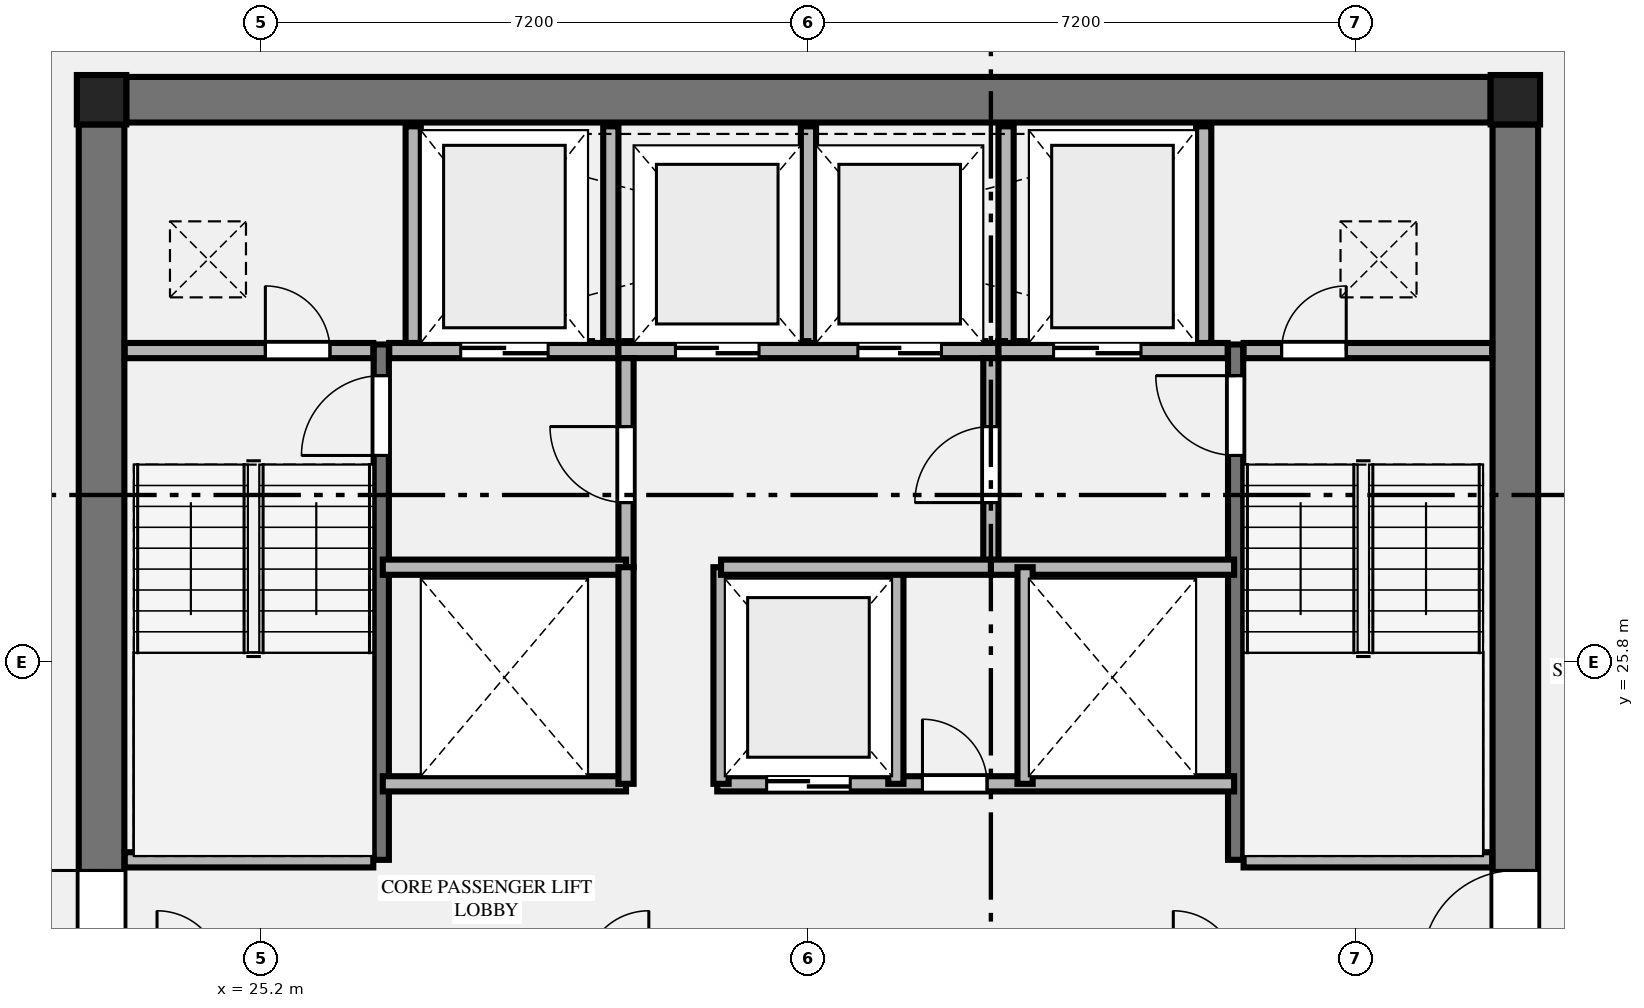
"""IFC4 building model, lengths in metres.
Left out: names, types, materials, properties, quantities, classifications, styles, units other than length and angle.
Written with IfcOpenShell. Run it as: python <this file> out.ifc"""

import sys

from ifc_helpers import new_model, si_unit, direction, frame, frame_2d, origin, origin_2d, place, context, subcontext, project, spatial, rectangle, extrude, element, fill, save


model = new_model("IFC4")
c1 = context("Model", 3, precision=1e-05, world=origin(), true_north=direction((0.0, 1.0)))
c2 = subcontext(c1, "Body", "Model", "MODEL_VIEW")
j1 = project(units=[si_unit("LENGTHUNIT", "METRE"), si_unit("PLANEANGLEUNIT", "RADIAN")], contexts=[c1])
p1 = place(None, origin())
s1 = spatial("IfcSite", under=j1, at=p1, CompositionType="ELEMENT")
p2 = place(p1, origin())
s2 = spatial("IfcBuilding", under=s1, at=p2, CompositionType="ELEMENT")
p3 = place(p2, frame((0.0, 0.0, 171.9)))
s3 = spatial("IfcBuildingStorey", under=s2, at=p3, CompositionType="ELEMENT", Elevation=171.9)
for number, where, z_axis, x_axis in (
    (1, (41.7, 33.2, 0.0), (0.0, 0.0, 1.0), (1.0, 0.0, 0.0)),
    (2, (23.1, 33.2, 0.0), (0.0, 0.0, 1.0), (1.0, 0.0, 0.0)),
):
    element("IfcColumn", number, at=place(p3, frame(where, z_axis=z_axis, x_axis=x_axis)), inside=s3, PredefinedType="COLUMN", context=c2, shape_type="SweptSolid", body=[
        extrude(rectangle(XDim=0.65, YDim=0.65, at=origin_2d()), origin(), (0.0, 0.0, 1.0), 3.55),
    ])
p4 = place(p3, frame((23.425, 33.2, 0.0), z_axis=(0.0, 0.0, 1.0), x_axis=(1.0, 0.0, 0.0)))
e3 = element("IfcWall", 3, at=p4, inside=s3, PredefinedType="SHEAR", context=c2, shape_type="SweptSolid", body=[
    extrude(rectangle(XDim=17.95, YDim=0.6, at=frame_2d((8.975, 0.0))), origin(), (0.0, 0.0, 1.0), 3.35),
])
p5 = place(p3, frame((23.1, 18.925, 0.0), z_axis=(0.0, 0.0, 1.0), x_axis=(0.0, 1.0, 0.0)))
e4 = element("IfcWall", 4, at=p5, inside=s3, PredefinedType="SHEAR", context=c2, shape_type="SweptSolid", body=[
    extrude(rectangle(XDim=13.95, YDim=0.6, at=frame_2d((6.975, 0.0))), origin(), (0.0, 0.0, 1.0), 3.35),
])
p6 = place(p5, frame((2.915, 0.0, 0.0)))
e5 = element("IfcOpeningElement", 5, at=p6, cuts=e4, PredefinedType="OPENING", context=c2, shape_type="SweptSolid", body=[
    extrude(rectangle(XDim=1.22, YDim=2.25, at=frame_2d((0.61, 1.125))), frame((0.0, 0.31, 0.0), z_axis=(0.0, -1.0, 0.0), x_axis=(1.0, 0.0, 0.0)), (0.0, 0.0, 1.0), 0.62),
])
p7 = place(p3, frame((41.7, 18.925, 0.0), z_axis=(0.0, 0.0, 1.0), x_axis=(0.0, 1.0, 0.0)))
e6 = element("IfcWall", 6, at=p7, inside=s3, PredefinedType="SHEAR", context=c2, shape_type="SweptSolid", body=[
    extrude(rectangle(XDim=13.95, YDim=0.6, at=frame_2d((6.975, 0.0))), origin(), (0.0, 0.0, 1.0), 3.35),
])
p8 = place(p7, frame((2.915, 0.0, 0.0)))
e7 = element("IfcOpeningElement", 7, at=p8, cuts=e6, PredefinedType="OPENING", context=c2, shape_type="SweptSolid", body=[
    extrude(rectangle(XDim=1.22, YDim=2.25, at=frame_2d((0.61, 1.125))), frame((0.0, 0.31, 0.0), z_axis=(0.0, -1.0, 0.0), x_axis=(1.0, 0.0, 0.0)), (0.0, 0.0, 1.0), 0.62),
])
p9 = place(p3, frame((26.78, 23.2, 0.0), z_axis=(0.0, 0.0, 1.0), x_axis=(0.0, 1.0, 0.0)))
e8 = element("IfcWall", 8, at=p9, inside=s3, PredefinedType="SHEAR", context=c2, shape_type="SweptSolid", body=[
    extrude(rectangle(XDim=6.78, YDim=0.2, at=frame_2d((3.39, 0.0))), origin(), (0.0, 0.0, 1.0), 3.55),
])
p10 = place(p9, frame((5.32, 0.0, 0.0)))
e9 = element("IfcOpeningElement", 9, at=p10, cuts=e8, PredefinedType="OPENING", context=c2, shape_type="SweptSolid", body=[
    extrude(rectangle(XDim=1.05, YDim=2.15, at=frame_2d((0.525, 1.075))), frame((0.0, 0.11, 0.0), z_axis=(0.0, -1.0, 0.0), x_axis=(1.0, 0.0, 0.0)), (0.0, 0.0, 1.0), 0.22),
])
p11 = place(p3, frame((23.405, 23.2, 0.0), z_axis=(0.0, 0.0, 1.0), x_axis=(1.0, 0.0, 0.0)))
e10 = element("IfcWall", 10, at=p11, inside=s3, PredefinedType="PLUMBINGWALL", context=c2, shape_type="SweptSolid", body=[
    extrude(rectangle(XDim=3.27, YDim=0.2, at=frame_2d((1.635, 0.0))), origin(), (0.0, 0.0, 1.0), 3.35),
])
p12 = place(p3, frame((38.02, 23.2, 0.0), z_axis=(0.0, 0.0, 1.0), x_axis=(0.0, 1.0, 0.0)))
e11 = element("IfcWall", 11, at=p12, inside=s3, PredefinedType="SHEAR", context=c2, shape_type="SweptSolid", body=[
    extrude(rectangle(XDim=6.78, YDim=0.2, at=frame_2d((3.39, 0.0))), origin(), (0.0, 0.0, 1.0), 3.55),
])
p13 = place(p12, frame((5.32, 0.0, 0.0)))
e12 = element("IfcOpeningElement", 12, at=p13, cuts=e11, PredefinedType="OPENING", context=c2, shape_type="SweptSolid", body=[
    extrude(rectangle(XDim=1.05, YDim=2.15, at=frame_2d((0.525, 1.075))), frame((0.0, 0.11, 0.0), z_axis=(0.0, -1.0, 0.0), x_axis=(1.0, 0.0, 0.0)), (0.0, 0.0, 1.0), 0.22),
])
p14 = place(p3, frame((38.125, 23.2, 0.0), z_axis=(0.0, 0.0, 1.0), x_axis=(1.0, 0.0, 0.0)))
e13 = element("IfcWall", 13, at=p14, inside=s3, PredefinedType="PLUMBINGWALL", context=c2, shape_type="SweptSolid", body=[
    extrude(rectangle(XDim=3.27, YDim=0.2, at=frame_2d((1.635, 0.0))), origin(), (0.0, 0.0, 1.0), 3.35),
])
p15 = place(p3, frame((23.405, 29.9, 0.0), z_axis=(0.0, 0.0, 1.0), x_axis=(1.0, 0.0, 0.0)))
e14 = element("IfcWall", 14, at=p15, inside=s3, PredefinedType="PLUMBINGWALL", context=c2, shape_type="SweptSolid", body=[
    extrude(rectangle(XDim=3.27, YDim=0.2, at=frame_2d((1.635, 0.0))), origin(), (0.0, 0.0, 1.0), 3.35),
])
p16 = place(p15, frame((1.85, 0.0, 0.0)))
e15 = element("IfcOpeningElement", 15, at=p16, cuts=e14, PredefinedType="OPENING", context=c2, shape_type="SweptSolid", body=[
    extrude(rectangle(XDim=0.85, YDim=2.05, at=frame_2d((0.425, 1.025))), frame((0.0, 0.11, 0.0), z_axis=(0.0, -1.0, 0.0), x_axis=(1.0, 0.0, 0.0)), (0.0, 0.0, 1.0), 0.22),
])
p17 = place(p3, frame((26.885, 29.9, 0.0), z_axis=(0.0, 0.0, 1.0), x_axis=(1.0, 0.0, 0.0)))
e16 = element("IfcWall", 16, at=p17, inside=s3, PredefinedType="PLUMBINGWALL", context=c2, shape_type="SweptSolid", body=[
    extrude(rectangle(XDim=3.015, YDim=0.2, at=frame_2d((1.507, 0.0))), origin(), (0.0, 0.0, 1.0), 3.35),
])
p18 = place(p17, frame((0.94, 0.0, 0.0)))
e17 = element("IfcOpeningElement", 17, at=p18, cuts=e16, PredefinedType="OPENING", context=c2, shape_type="SweptSolid", body=[
    extrude(rectangle(XDim=1.15, YDim=2.2, at=frame_2d((0.575, 1.1))), frame((0.0, 0.11, 0.0), z_axis=(0.0, -1.0, 0.0), x_axis=(1.0, 0.0, 0.0)), (0.0, 0.0, 1.0), 0.22),
])
p19 = place(p3, frame((29.9, 29.9, 0.0), z_axis=(0.0, 0.0, 1.0), x_axis=(1.0, 0.0, 0.0)))
e18 = element("IfcWall", 18, at=p19, inside=s3, PredefinedType="PLUMBINGWALL", context=c2, shape_type="SweptSolid", body=[
    extrude(rectangle(XDim=5.0, YDim=0.2, at=frame_2d((2.5, 0.0))), origin(), (0.0, 0.0, 1.0), 3.35),
])
p20 = place(p19, frame((0.75, 0.0, 0.0)))
e19 = element("IfcOpeningElement", 19, at=p20, cuts=e18, PredefinedType="OPENING", context=c2, shape_type="SweptSolid", body=[
    extrude(rectangle(XDim=1.1, YDim=2.2, at=frame_2d((0.55, 1.1))), frame((0.0, 0.11, 0.0), z_axis=(0.0, -1.0, 0.0), x_axis=(1.0, 0.0, 0.0)), (0.0, 0.0, 1.0), 0.22),
])
p21 = place(p19, frame((3.15, 0.0, 0.0)))
e20 = element("IfcOpeningElement", 20, at=p21, cuts=e18, PredefinedType="OPENING", context=c2, shape_type="SweptSolid", body=[
    extrude(rectangle(XDim=1.1, YDim=2.2, at=frame_2d((0.55, 1.1))), frame((0.0, 0.11, 0.0), z_axis=(0.0, -1.0, 0.0), x_axis=(1.0, 0.0, 0.0)), (0.0, 0.0, 1.0), 0.22),
])
p22 = place(p3, frame((34.9, 29.9, 0.0), z_axis=(0.0, 0.0, 1.0), x_axis=(1.0, 0.0, 0.0)))
e21 = element("IfcWall", 21, at=p22, inside=s3, PredefinedType="PLUMBINGWALL", context=c2, shape_type="SweptSolid", body=[
    extrude(rectangle(XDim=3.015, YDim=0.2, at=frame_2d((1.508, 0.0))), origin(), (0.0, 0.0, 1.0), 3.35),
])
p23 = place(p22, frame((0.725, 0.0, 0.0)))
e22 = element("IfcOpeningElement", 22, at=p23, cuts=e21, PredefinedType="OPENING", context=c2, shape_type="SweptSolid", body=[
    extrude(rectangle(XDim=1.15, YDim=2.2, at=frame_2d((0.575, 1.1))), frame((0.0, 0.11, 0.0), z_axis=(0.0, -1.0, 0.0), x_axis=(1.0, 0.0, 0.0)), (0.0, 0.0, 1.0), 0.22),
])
p24 = place(p3, frame((38.125, 29.9, 0.0), z_axis=(0.0, 0.0, 1.0), x_axis=(1.0, 0.0, 0.0)))
e23 = element("IfcWall", 23, at=p24, inside=s3, PredefinedType="PLUMBINGWALL", context=c2, shape_type="SweptSolid", body=[
    extrude(rectangle(XDim=3.27, YDim=0.2, at=frame_2d((1.635, 0.0))), origin(), (0.0, 0.0, 1.0), 3.35),
])
p25 = place(p24, frame((0.5, 0.0, 0.0)))
e24 = element("IfcOpeningElement", 24, at=p25, cuts=e23, PredefinedType="OPENING", context=c2, shape_type="SweptSolid", body=[
    extrude(rectangle(XDim=0.85, YDim=2.05, at=frame_2d((0.425, 1.025))), frame((0.0, 0.11, 0.0), z_axis=(0.0, -1.0, 0.0), x_axis=(1.0, 0.0, 0.0)), (0.0, 0.0, 1.0), 0.22),
])
for number, where, z_axis, x_axis in (
    (25, (27.2, 30.0, 0.0), (0.0, 0.0, 1.0), (0.0, 1.0, 0.0)),
    (26, (29.8, 30.0, 0.0), (0.0, 0.0, 1.0), (0.0, 1.0, 0.0)),
    (27, (32.4, 30.0, 0.0), (0.0, 0.0, 1.0), (0.0, 1.0, 0.0)),
    (28, (35.0, 30.0, 0.0), (0.0, 0.0, 1.0), (0.0, 1.0, 0.0)),
    (29, (37.6, 30.0, 0.0), (0.0, 0.0, 1.0), (0.0, 1.0, 0.0)),
):
    element("IfcWall", number, at=place(p3, frame(where, z_axis=z_axis, x_axis=x_axis)), inside=s3, PredefinedType="PLUMBINGWALL", context=c2, shape_type="SweptSolid", body=[
        extrude(rectangle(XDim=2.85, YDim=0.2, at=frame_2d((1.425, 0.0))), origin(), (0.0, 0.0, 1.0), 3.35),
    ])
p26 = place(p3, frame((30.0, 27.05, 0.0), z_axis=(0.0, 0.0, 1.0), x_axis=(0.0, 1.0, 0.0)))
e30 = element("IfcWall", 30, at=p26, inside=s3, PredefinedType="PLUMBINGWALL", context=c2, shape_type="SweptSolid", body=[
    extrude(rectangle(XDim=2.75, YDim=0.2, at=frame_2d((1.375, 0.0))), origin(), (0.0, 0.0, 1.0), 3.35),
])
p27 = place(p26, frame((0.85, 0.0, 0.0)))
e31 = element("IfcOpeningElement", 31, at=p27, cuts=e30, PredefinedType="OPENING", context=c2, shape_type="SweptSolid", body=[
    extrude(rectangle(XDim=1.0, YDim=2.15, at=frame_2d((0.5, 1.075))), frame((0.0, 0.11, 0.0), z_axis=(0.0, -1.0, 0.0), x_axis=(1.0, 0.0, 0.0)), (0.0, 0.0, 1.0), 0.22),
])
p28 = place(p3, frame((26.8, 27.05, 0.0), z_axis=(0.0, 0.0, 1.0), x_axis=(1.0, 0.0, 0.0)))
e32 = element("IfcWall", 32, at=p28, inside=s3, PredefinedType="PLUMBINGWALL", context=c2, shape_type="SweptSolid", body=[
    extrude(rectangle(XDim=3.2, YDim=0.2, at=frame_2d((1.6, 0.0))), origin(), (0.0, 0.0, 1.0), 3.35),
])
p29 = place(p3, frame((34.8, 27.05, 0.0), z_axis=(0.0, 0.0, 1.0), x_axis=(0.0, 1.0, 0.0)))
e33 = element("IfcWall", 33, at=p29, inside=s3, PredefinedType="PLUMBINGWALL", context=c2, shape_type="SweptSolid", body=[
    extrude(rectangle(XDim=2.75, YDim=0.2, at=frame_2d((1.375, 0.0))), origin(), (0.0, 0.0, 1.0), 3.35),
])
p30 = place(p29, frame((0.85, 0.0, 0.0)))
e34 = element("IfcOpeningElement", 34, at=p30, cuts=e33, PredefinedType="OPENING", context=c2, shape_type="SweptSolid", body=[
    extrude(rectangle(XDim=1.0, YDim=2.15, at=frame_2d((0.5, 1.075))), frame((0.0, 0.11, 0.0), z_axis=(0.0, -1.0, 0.0), x_axis=(1.0, 0.0, 0.0)), (0.0, 0.0, 1.0), 0.22),
])
for number, where, z_axis, x_axis in (
    (35, (34.8, 27.05, 0.0), (0.0, 0.0, 1.0), (1.0, 0.0, 0.0)),
    (36, (26.8, 24.2, 0.0), (0.0, 0.0, 1.0), (1.0, 0.0, 0.0)),
):
    element("IfcWall", number, at=place(p3, frame(where, z_axis=z_axis, x_axis=x_axis)), inside=s3, PredefinedType="PLUMBINGWALL", context=c2, shape_type="SweptSolid", body=[
        extrude(rectangle(XDim=3.2, YDim=0.2, at=frame_2d((1.6, 0.0))), origin(), (0.0, 0.0, 1.0), 3.35),
    ])
p31 = place(p3, frame((30.0, 24.2, 0.0), z_axis=(0.0, 0.0, 1.0), x_axis=(0.0, 1.0, 0.0)))
e37 = element("IfcWall", 37, at=p31, inside=s3, PredefinedType="PLUMBINGWALL", context=c2, shape_type="SweptSolid", body=[
    extrude(rectangle(XDim=2.85, YDim=0.2, at=frame_2d((1.425, 0.0))), origin(), (0.0, 0.0, 1.0), 3.35),
])
p32 = place(p3, frame((31.2, 24.2, 0.0), z_axis=(0.0, 0.0, 1.0), x_axis=(1.0, 0.0, 0.0)))
e38 = element("IfcWall", 38, at=p32, inside=s3, PredefinedType="PLUMBINGWALL", context=c2, shape_type="SweptSolid", body=[
    extrude(rectangle(XDim=6.8, YDim=0.2, at=frame_2d((3.4, 0.0))), origin(), (0.0, 0.0, 1.0), 3.35),
])
p33 = place(p32, frame((0.65, 0.0, 0.0)))
e39 = element("IfcOpeningElement", 39, at=p33, cuts=e38, PredefinedType="OPENING", context=c2, shape_type="SweptSolid", body=[
    extrude(rectangle(XDim=1.1, YDim=2.2, at=frame_2d((0.55, 1.1))), frame((0.0, 0.11, 0.0), z_axis=(0.0, -1.0, 0.0), x_axis=(1.0, 0.0, 0.0)), (0.0, 0.0, 1.0), 0.22),
])
p34 = place(p32, frame((2.7, 0.0, 0.0)))
e40 = element("IfcOpeningElement", 40, at=p34, cuts=e38, PredefinedType="OPENING", context=c2, shape_type="SweptSolid", body=[
    extrude(rectangle(XDim=0.85, YDim=2.05, at=frame_2d((0.425, 1.025))), frame((0.0, 0.11, 0.0), z_axis=(0.0, -1.0, 0.0), x_axis=(1.0, 0.0, 0.0)), (0.0, 0.0, 1.0), 0.22),
])
for number, where, z_axis, x_axis in (
    (41, (31.25, 24.2, 0.0), (0.0, 0.0, 1.0), (0.0, 1.0, 0.0)),
    (42, (33.55, 24.2, 0.0), (0.0, 0.0, 1.0), (0.0, 1.0, 0.0)),
    (43, (35.25, 24.2, 0.0), (0.0, 0.0, 1.0), (0.0, 1.0, 0.0)),
):
    element("IfcWall", number, at=place(p3, frame(where, z_axis=z_axis, x_axis=x_axis)), inside=s3, PredefinedType="PLUMBINGWALL", context=c2, shape_type="SweptSolid", body=[
        extrude(rectangle(XDim=2.85, YDim=0.2, at=frame_2d((1.425, 0.0))), origin(), (0.0, 0.0, 1.0), 3.35),
    ])
p35 = place(p3, frame((31.25, 27.05, 0.0), z_axis=(0.0, 0.0, 1.0), x_axis=(1.0, 0.0, 0.0)))
e44 = element("IfcWall", 44, at=p35, inside=s3, PredefinedType="PLUMBINGWALL", context=c2, shape_type="SweptSolid", body=[
    extrude(rectangle(XDim=3.55, YDim=0.2, at=frame_2d((1.775, 0.0))), origin(), (0.0, 0.0, 1.0), 3.35),
])
p36 = place(p6, origin())
e45 = element("IfcDoor", 45, at=p36, inside=s3, OperationType="SINGLE_SWING_RIGHT", PredefinedType="DOOR", context=c2, shape_type="SweptSolid", body=[
    extrude(rectangle(XDim=1.22, YDim=2.25, at=frame_2d((0.61, 1.125))), frame((0.0, 0.025, 0.0), z_axis=(0.0, -1.0, 0.0), x_axis=(1.0, 0.0, 0.0)), (0.0, 0.0, 1.0), 0.05),
])
fill(e5, e45)
p37 = place(p8, origin())
e46 = element("IfcDoor", 46, at=p37, inside=s3, OperationType="SINGLE_SWING_LEFT", PredefinedType="DOOR", context=c2, shape_type="SweptSolid", body=[
    extrude(rectangle(XDim=1.22, YDim=2.25, at=frame_2d((0.61, 1.125))), frame((0.0, 0.025, 0.0), z_axis=(0.0, -1.0, 0.0), x_axis=(1.0, 0.0, 0.0)), (0.0, 0.0, 1.0), 0.05),
])
fill(e7, e46)
p38 = place(p10, origin())
e47 = element("IfcDoor", 47, at=p38, inside=s3, OperationType="SINGLE_SWING_LEFT", PredefinedType="DOOR", context=c2, shape_type="SweptSolid", body=[
    extrude(rectangle(XDim=1.05, YDim=2.15, at=frame_2d((0.525, 1.075))), frame((0.0, 0.025, 0.0), z_axis=(0.0, -1.0, 0.0), x_axis=(1.0, 0.0, 0.0)), (0.0, 0.0, 1.0), 0.05),
])
fill(e9, e47)
p39 = place(p13, origin())
e48 = element("IfcDoor", 48, at=p39, inside=s3, OperationType="SINGLE_SWING_RIGHT", PredefinedType="DOOR", context=c2, shape_type="SweptSolid", body=[
    extrude(rectangle(XDim=1.05, YDim=2.15, at=frame_2d((0.525, 1.075))), frame((0.0, 0.025, 0.0), z_axis=(0.0, -1.0, 0.0), x_axis=(1.0, 0.0, 0.0)), (0.0, 0.0, 1.0), 0.05),
])
fill(e12, e48)
p40 = place(p16, origin())
e49 = element("IfcDoor", 49, at=p40, inside=s3, OperationType="SINGLE_SWING_LEFT", PredefinedType="DOOR", context=c2, shape_type="SweptSolid", body=[
    extrude(rectangle(XDim=0.85, YDim=2.05, at=frame_2d((0.425, 1.025))), frame((0.0, 0.025, 0.0), z_axis=(0.0, -1.0, 0.0), x_axis=(1.0, 0.0, 0.0)), (0.0, 0.0, 1.0), 0.05),
])
fill(e15, e49)
p41 = place(p25, origin())
e50 = element("IfcDoor", 50, at=p41, inside=s3, OperationType="SINGLE_SWING_RIGHT", PredefinedType="DOOR", context=c2, shape_type="SweptSolid", body=[
    extrude(rectangle(XDim=0.85, YDim=2.05, at=frame_2d((0.425, 1.025))), frame((0.0, 0.025, 0.0), z_axis=(0.0, -1.0, 0.0), x_axis=(1.0, 0.0, 0.0)), (0.0, 0.0, 1.0), 0.05),
])
fill(e24, e50)
p42 = place(p18, origin())
e51 = element("IfcDoor", 51, at=p42, inside=s3, OperationType="DOUBLE_DOOR_SLIDING", PredefinedType="DOOR", context=c2, shape_type="SweptSolid", body=[
    extrude(rectangle(XDim=1.15, YDim=2.2, at=frame_2d((0.575, 1.1))), frame((0.0, 0.025, 0.0), z_axis=(0.0, -1.0, 0.0), x_axis=(1.0, 0.0, 0.0)), (0.0, 0.0, 1.0), 0.05),
])
fill(e17, e51)
p43 = place(p23, origin())
e52 = element("IfcDoor", 52, at=p43, inside=s3, OperationType="DOUBLE_DOOR_SLIDING", PredefinedType="DOOR", context=c2, shape_type="SweptSolid", body=[
    extrude(rectangle(XDim=1.15, YDim=2.2, at=frame_2d((0.575, 1.1))), frame((0.0, 0.025, 0.0), z_axis=(0.0, -1.0, 0.0), x_axis=(1.0, 0.0, 0.0)), (0.0, 0.0, 1.0), 0.05),
])
fill(e22, e52)
p44 = place(p20, origin())
e53 = element("IfcDoor", 53, at=p44, inside=s3, OperationType="DOUBLE_DOOR_SLIDING", PredefinedType="DOOR", context=c2, shape_type="SweptSolid", body=[
    extrude(rectangle(XDim=1.1, YDim=2.2, at=frame_2d((0.55, 1.1))), frame((0.0, 0.025, 0.0), z_axis=(0.0, -1.0, 0.0), x_axis=(1.0, 0.0, 0.0)), (0.0, 0.0, 1.0), 0.05),
])
fill(e19, e53)
p45 = place(p21, origin())
e54 = element("IfcDoor", 54, at=p45, inside=s3, OperationType="DOUBLE_DOOR_SLIDING", PredefinedType="DOOR", context=c2, shape_type="SweptSolid", body=[
    extrude(rectangle(XDim=1.1, YDim=2.2, at=frame_2d((0.55, 1.1))), frame((0.0, 0.025, 0.0), z_axis=(0.0, -1.0, 0.0), x_axis=(1.0, 0.0, 0.0)), (0.0, 0.0, 1.0), 0.05),
])
fill(e20, e54)
p46 = place(p27, origin())
e55 = element("IfcDoor", 55, at=p46, inside=s3, OperationType="SINGLE_SWING_RIGHT", PredefinedType="DOOR", context=c2, shape_type="SweptSolid", body=[
    extrude(rectangle(XDim=1.0, YDim=2.15, at=frame_2d((0.5, 1.075))), frame((0.0, 0.025, 0.0), z_axis=(0.0, -1.0, 0.0), x_axis=(1.0, 0.0, 0.0)), (0.0, 0.0, 1.0), 0.05),
])
fill(e31, e55)
p47 = place(p30, origin())
e56 = element("IfcDoor", 56, at=p47, inside=s3, OperationType="SINGLE_SWING_LEFT", PredefinedType="DOOR", context=c2, shape_type="SweptSolid", body=[
    extrude(rectangle(XDim=1.0, YDim=2.15, at=frame_2d((0.5, 1.075))), frame((0.0, 0.025, 0.0), z_axis=(0.0, -1.0, 0.0), x_axis=(1.0, 0.0, 0.0)), (0.0, 0.0, 1.0), 0.05),
])
fill(e34, e56)
p48 = place(p33, origin())
e57 = element("IfcDoor", 57, at=p48, inside=s3, OperationType="DOUBLE_DOOR_SLIDING", PredefinedType="DOOR", context=c2, shape_type="SweptSolid", body=[
    extrude(rectangle(XDim=1.1, YDim=2.2, at=frame_2d((0.55, 1.1))), frame((0.0, 0.025, 0.0), z_axis=(0.0, -1.0, 0.0), x_axis=(1.0, 0.0, 0.0)), (0.0, 0.0, 1.0), 0.05),
])
fill(e39, e57)
p49 = place(p34, origin())
e58 = element("IfcDoor", 58, at=p49, inside=s3, OperationType="SINGLE_SWING_LEFT", PredefinedType="DOOR", context=c2, shape_type="SweptSolid", body=[
    extrude(rectangle(XDim=0.85, YDim=2.05, at=frame_2d((0.425, 1.025))), frame((0.0, 0.025, 0.0), z_axis=(0.0, -1.0, 0.0), x_axis=(1.0, 0.0, 0.0)), (0.0, 0.0, 1.0), 0.05),
])
fill(e40, e58)
save(model, sys.argv[1])
